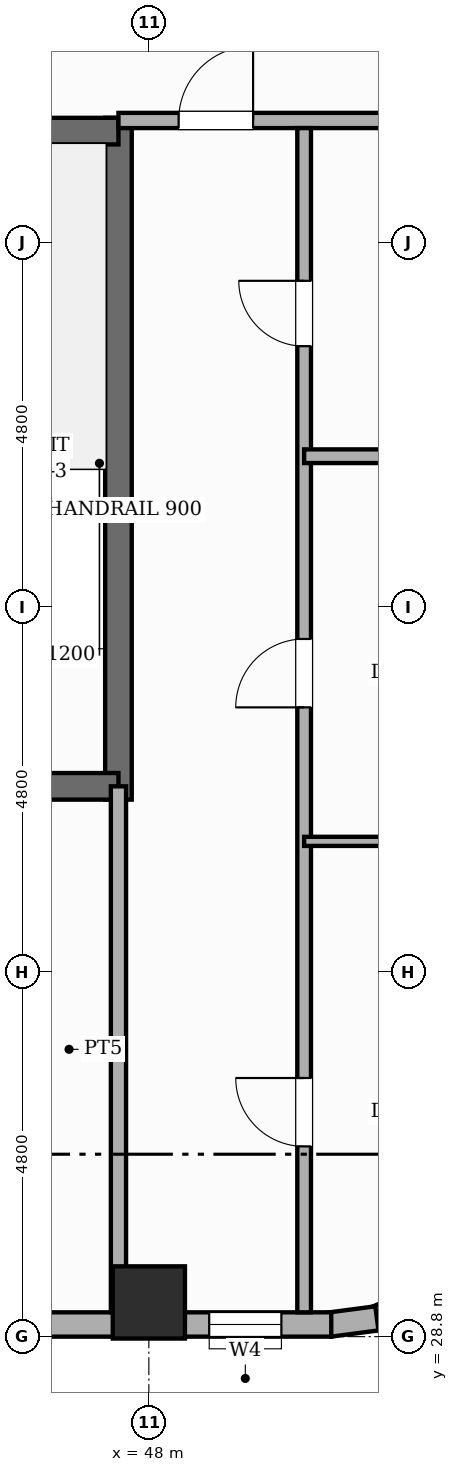
"""IFC4 building model, lengths in metres.
Left out: names, types, materials, properties, quantities, classifications, styles, units other than length and angle.
Written with IfcOpenShell. Run it as: python <this file> out.ifc"""

import sys

from ifc_helpers import new_model, si_unit, direction, frame, frame_2d, origin, origin_2d, place, context, subcontext, project, spatial, rectangle, extrude, element, fill, save


model = new_model("IFC4")
c1 = context("Model", 3, precision=1e-05, world=origin(), true_north=direction((0.0, 1.0)))
c2 = subcontext(c1, "Body", "Model", "MODEL_VIEW")
j1 = project(units=[si_unit("LENGTHUNIT", "METRE"), si_unit("PLANEANGLEUNIT", "RADIAN")], contexts=[c1])
p1 = place(None, origin())
s1 = spatial("IfcSite", under=j1, at=p1, CompositionType="ELEMENT")
p2 = place(p1, origin())
s2 = spatial("IfcBuilding", under=s1, at=p2, CompositionType="ELEMENT")
p3 = place(p2, frame((0.0, 0.0, 154.0)))
s3 = spatial("IfcBuildingStorey", under=s2, at=p3, CompositionType="ELEMENT", Elevation=154.0)
p4 = place(p3, frame((47.6, 35.865, 0.0), z_axis=(0.0, 0.0, 1.0), x_axis=(0.0, 1.0, 0.0)))
e1 = element("IfcWall", 1, at=p4, inside=s3, PredefinedType="SHEAR", context=c2, shape_type="SweptSolid", body=[
    extrude(rectangle(XDim=8.97, YDim=0.35, at=frame_2d((4.485, 0.0))), origin(), (0.0, 0.0, 1.0), 3.6),
])
for number, where, z_axis, x_axis in (
    (2, (44.02, 36.04, 0.0), (0.0, 0.0, 1.0), (1.0, 0.0, 0.0)),
    (3, (44.02, 44.66, 0.0), (0.0, 0.0, 1.0), (1.0, 0.0, 0.0)),
):
    element("IfcWall", number, at=place(p3, frame(where, z_axis=z_axis, x_axis=x_axis)), inside=s3, PredefinedType="SHEAR", context=c2, shape_type="SweptSolid", body=[
        extrude(rectangle(XDim=3.58, YDim=0.35, at=frame_2d((1.79, 0.0))), origin(), (0.0, 0.0, 1.0), 3.6),
    ])
p5 = place(p3, frame((48.0, 29.25, 0.0), z_axis=(0.0, 0.0, 1.0), x_axis=(1.0, 0.0, 0.0)))
e4 = element("IfcColumn", 4, at=p5, inside=s3, PredefinedType="COLUMN", context=c2, shape_type="SweptSolid", body=[
    extrude(rectangle(XDim=0.95, YDim=0.95, at=origin_2d()), origin(), (0.0, 0.0, 1.0), 3.6),
])
for number, where, z_axis, x_axis in (
    (5, (51.539, 29.269, 0.0), (0.0, 0.0, 1.0), (-0.924, -0.383, 0.0)),
    (6, (51.0, 29.04, 0.0), (0.0, 0.0, 1.0), (-0.991, -0.131, 0.0)),
):
    element("IfcWall", number, at=place(p3, frame(where, z_axis=z_axis, x_axis=x_axis)), inside=s3, PredefinedType="STANDARD", context=c2, shape_type="SweptSolid", body=[
        extrude(rectangle(XDim=0.626, YDim=0.32, at=frame_2d((0.313, 0.0))), origin(), (0.0, 0.0, 1.0), 2.54),
    ])
p6 = place(p3, frame((50.4, 28.96, 0.0), z_axis=(0.0, 0.0, 1.0), x_axis=(-1.0, 0.0, 0.0)))
e7 = element("IfcWall", 7, at=p6, inside=s3, PredefinedType="STANDARD", context=c2, shape_type="SweptSolid", body=[
    extrude(rectangle(XDim=12.0, YDim=0.32, at=frame_2d((6.0, 0.0))), origin(), (0.0, 0.0, 1.0), 2.54),
])
p7 = place(p6, frame((0.656, 0.0, 0.45)))
e8 = element("IfcOpeningElement", 8, at=p7, cuts=e7, PredefinedType="OPENING", context=c2, shape_type="SweptSolid", body=[
    extrude(rectangle(XDim=0.95, YDim=1.8, at=frame_2d((0.475, 0.9))), frame((0.0, 0.17, 0.0), z_axis=(0.0, -1.0, 0.0), x_axis=(1.0, 0.0, 0.0)), (0.0, 0.0, 1.0), 0.34),
])
p8 = place(p6, frame((9.425, 0.0, 0.65)))
e9 = element("IfcOpeningElement", 9, at=p8, cuts=e7, PredefinedType="OPENING", context=c2, shape_type="SweptSolid", body=[
    extrude(rectangle(XDim=1.4, YDim=1.1, at=frame_2d((0.7, 0.55))), frame((0.0, 0.17, 0.0), z_axis=(0.0, -1.0, 0.0), x_axis=(1.0, 0.0, 0.0)), (0.0, 0.0, 1.0), 0.34),
])
p9 = place(p6, frame((4.1, 0.0, 0.65)))
e10 = element("IfcOpeningElement", 10, at=p9, cuts=e7, PredefinedType="OPENING", context=c2, shape_type="SweptSolid", body=[
    extrude(rectangle(XDim=1.4, YDim=1.1, at=frame_2d((0.7, 0.55))), frame((0.0, 0.17, 0.0), z_axis=(0.0, -1.0, 0.0), x_axis=(1.0, 0.0, 0.0)), (0.0, 0.0, 1.0), 0.34),
])
p10 = place(p3, frame((47.6, 44.8, 0.0), z_axis=(0.0, 0.0, 1.0), x_axis=(1.0, 0.0, 0.0)))
e11 = element("IfcWall", 11, at=p10, inside=s3, PredefinedType="PARTITIONING", context=c2, shape_type="SweptSolid", body=[
    extrude(rectangle(XDim=4.88, YDim=0.2, at=frame_2d((2.44, 0.0))), origin(), (0.0, 0.0, 1.0), 3.36),
])
p11 = place(p10, frame((0.792, 0.0, 0.0)))
e12 = element("IfcOpeningElement", 12, at=p11, cuts=e11, PredefinedType="OPENING", context=c2, shape_type="SweptSolid", body=[
    extrude(rectangle(XDim=0.98, YDim=2.18, at=frame_2d((0.49, 1.09))), frame((0.0, 0.11, 0.0), z_axis=(0.0, -1.0, 0.0), x_axis=(1.0, 0.0, 0.0)), (0.0, 0.0, 1.0), 0.22),
])
p12 = place(p3, frame((47.6, 29.12, 0.0), z_axis=(0.0, 0.0, 1.0), x_axis=(0.0, 1.0, 0.0)))
e13 = element("IfcWall", 13, at=p12, inside=s3, PredefinedType="SOLIDWALL", context=c2, shape_type="SweptSolid", body=[
    extrude(rectangle(XDim=6.92, YDim=0.2, at=frame_2d((3.46, 0.0))), origin(), (0.0, 0.0, 1.0), 3.36),
])
p13 = place(p3, frame((50.043, 29.12, 0.0), z_axis=(0.0, 0.0, 1.0), x_axis=(0.0, 1.0, 0.0)))
e14 = element("IfcWall", 14, at=p13, inside=s3, PredefinedType="PLUMBINGWALL", context=c2, shape_type="SweptSolid", body=[
    extrude(rectangle(XDim=15.58, YDim=0.18, at=frame_2d((7.79, 0.0))), origin(), (0.0, 0.0, 1.0), 3.36),
])
p14 = place(p13, frame((2.183, 0.0, 0.0)))
e15 = element("IfcOpeningElement", 15, at=p14, cuts=e14, PredefinedType="OPENING", context=c2, shape_type="SweptSolid", body=[
    extrude(rectangle(XDim=0.9, YDim=2.15, at=frame_2d((0.45, 1.075))), frame((0.0, 0.1, 0.0), z_axis=(0.0, -1.0, 0.0), x_axis=(1.0, 0.0, 0.0)), (0.0, 0.0, 1.0), 0.2),
])
p15 = place(p13, frame((7.959, 0.0, 0.0)))
e16 = element("IfcOpeningElement", 16, at=p15, cuts=e14, PredefinedType="OPENING", context=c2, shape_type="SweptSolid", body=[
    extrude(rectangle(XDim=0.9, YDim=2.15, at=frame_2d((0.45, 1.075))), frame((0.0, 0.1, 0.0), z_axis=(0.0, -1.0, 0.0), x_axis=(1.0, 0.0, 0.0)), (0.0, 0.0, 1.0), 0.2),
])
p16 = place(p13, frame((12.711, 0.0, 0.0)))
e17 = element("IfcOpeningElement", 17, at=p16, cuts=e14, PredefinedType="OPENING", context=c2, shape_type="SweptSolid", body=[
    extrude(rectangle(XDim=0.86, YDim=2.1, at=frame_2d((0.43, 1.05))), frame((0.0, 0.1, 0.0), z_axis=(0.0, -1.0, 0.0), x_axis=(1.0, 0.0, 0.0)), (0.0, 0.0, 1.0), 0.2),
])
p17 = place(p3, frame((50.043, 35.316, 0.0), z_axis=(0.0, 0.0, 1.0), x_axis=(1.0, 0.0, 0.0)))
e18 = element("IfcWall", 18, at=p17, inside=s3, PredefinedType="PARTITIONING", context=c2, shape_type="SweptSolid", body=[
    extrude(rectangle(XDim=2.437, YDim=0.12, at=frame_2d((1.219, 0.0))), origin(), (0.0, 0.0, 1.0), 3.36),
])
p18 = place(p3, frame((50.043, 40.383, 0.0), z_axis=(0.0, 0.0, 1.0), x_axis=(1.0, 0.0, 0.0)))
e19 = element("IfcWall", 19, at=p18, inside=s3, PredefinedType="PLUMBINGWALL", context=c2, shape_type="SweptSolid", body=[
    extrude(rectangle(XDim=2.437, YDim=0.18, at=frame_2d((1.219, 0.0))), origin(), (0.0, 0.0, 1.0), 3.36),
])
p19 = place(p7, origin())
e20 = element("IfcWindow", 20, at=p19, inside=s3, PartitioningType="SINGLE_PANEL", PredefinedType="WINDOW", context=c2, shape_type="SweptSolid", body=[
    extrude(rectangle(XDim=0.95, YDim=1.8, at=frame_2d((0.475, 0.9))), frame((0.0, 0.03, 0.0), z_axis=(0.0, -1.0, 0.0), x_axis=(1.0, 0.0, 0.0)), (0.0, 0.0, 1.0), 0.06),
])
fill(e8, e20)
p20 = place(p11, origin())
e21 = element("IfcDoor", 21, at=p20, inside=s3, OperationType="SINGLE_SWING_RIGHT", PredefinedType="DOOR", context=c2, shape_type="SweptSolid", body=[
    extrude(rectangle(XDim=0.98, YDim=2.18, at=frame_2d((0.49, 1.09))), frame((0.0, 0.025, 0.0), z_axis=(0.0, -1.0, 0.0), x_axis=(1.0, 0.0, 0.0)), (0.0, 0.0, 1.0), 0.05),
])
fill(e12, e21)
p21 = place(p14, origin())
e22 = element("IfcDoor", 22, at=p21, inside=s3, OperationType="SINGLE_SWING_RIGHT", PredefinedType="DOOR", context=c2, shape_type="SweptSolid", body=[
    extrude(rectangle(XDim=0.9, YDim=2.15, at=frame_2d((0.45, 1.075))), frame((0.0, 0.025, 0.0), z_axis=(0.0, -1.0, 0.0), x_axis=(1.0, 0.0, 0.0)), (0.0, 0.0, 1.0), 0.05),
])
fill(e15, e22)
p22 = place(p15, origin())
e23 = element("IfcDoor", 23, at=p22, inside=s3, OperationType="SINGLE_SWING_LEFT", PredefinedType="DOOR", context=c2, shape_type="SweptSolid", body=[
    extrude(rectangle(XDim=0.9, YDim=2.15, at=frame_2d((0.45, 1.075))), frame((0.0, 0.025, 0.0), z_axis=(0.0, -1.0, 0.0), x_axis=(1.0, 0.0, 0.0)), (0.0, 0.0, 1.0), 0.05),
])
fill(e16, e23)
p23 = place(p16, origin())
e24 = element("IfcDoor", 24, at=p23, inside=s3, OperationType="SINGLE_SWING_RIGHT", PredefinedType="DOOR", context=c2, shape_type="SweptSolid", body=[
    extrude(rectangle(XDim=0.86, YDim=2.1, at=frame_2d((0.43, 1.05))), frame((0.0, 0.025, 0.0), z_axis=(0.0, -1.0, 0.0), x_axis=(1.0, 0.0, 0.0)), (0.0, 0.0, 1.0), 0.05),
])
fill(e17, e24)
save(model, sys.argv[1])
